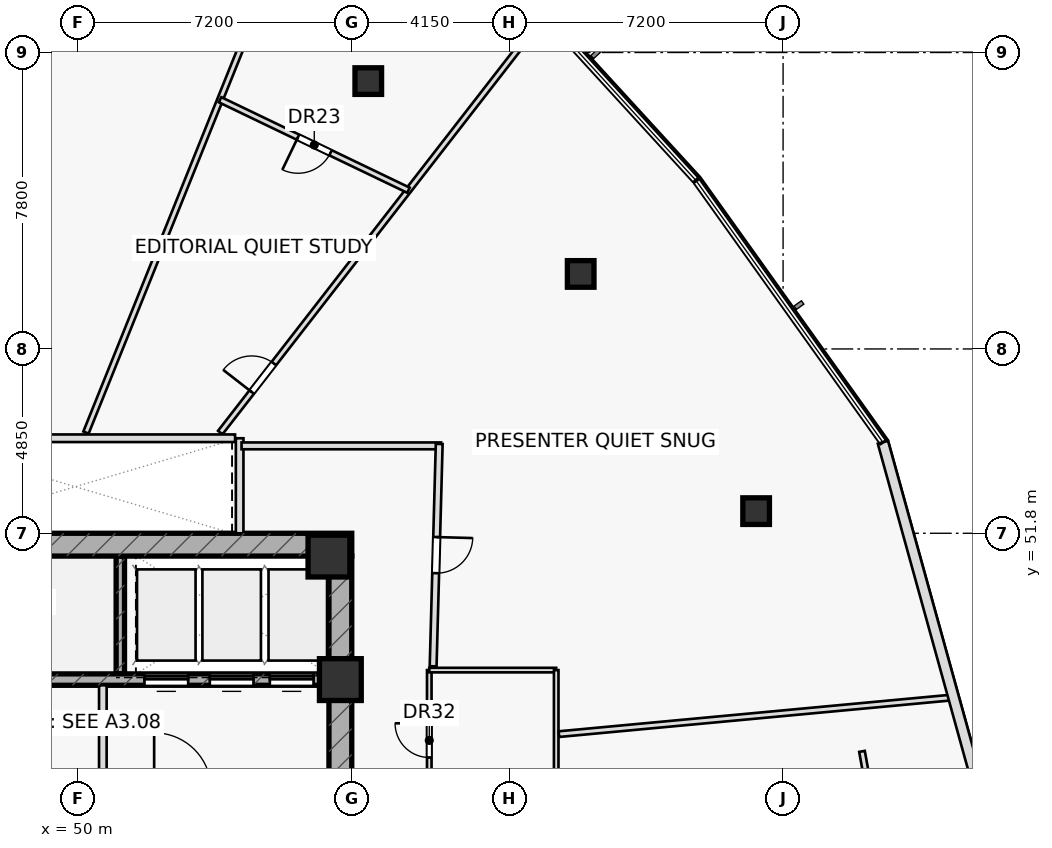
"""IFC4 building model, lengths in metres.
Left out: names, types, materials, properties, quantities, classifications, styles, units other than length and angle.
Written with IfcOpenShell. Run it as: python <this file> out.ifc"""

import sys

from ifc_helpers import new_model, si_unit, direction, frame, frame_2d, origin, origin_2d, place, context, subcontext, project, spatial, rectangle, hollow_rectangle, extrude, element, fill, save


model = new_model("IFC4")
c1 = context("Model", 3, precision=1e-05, world=origin(), true_north=direction((0.0, 1.0)))
c2 = subcontext(c1, "Body", "Model", "MODEL_VIEW")
j1 = project(units=[si_unit("LENGTHUNIT", "METRE"), si_unit("PLANEANGLEUNIT", "RADIAN")], contexts=[c1])
p1 = place(None, origin())
s1 = spatial("IfcSite", under=j1, at=p1, CompositionType="ELEMENT")
p2 = place(p1, origin())
s2 = spatial("IfcBuilding", under=s1, at=p2, CompositionType="ELEMENT")
p3 = place(p2, frame((0.0, 0.0, 62.7)))
s3 = spatial("IfcBuildingStorey", under=s2, at=p3, CompositionType="ELEMENT", Elevation=62.7)
p4 = place(p3, frame((51.11, 48.1, 0.0), z_axis=(0.0, 0.0, 1.0), x_axis=(0.0, 1.0, 0.0)))
e1 = element("IfcWall", 1, at=p4, inside=s3, PredefinedType="SHEAR", context=c2, shape_type="SweptSolid", body=[
    extrude(rectangle(XDim=3.1, YDim=0.22, at=frame_2d((1.55, 0.0))), origin(), (0.0, 0.0, 1.0), 3.6),
])
p5 = place(p3, frame((42.8, 51.5, 0.0), z_axis=(0.0, 0.0, 1.0), x_axis=(1.0, 0.0, 0.0)))
e2 = element("IfcWall", 2, at=p5, inside=s3, PredefinedType="SHEAR", context=c2, shape_type="SweptSolid", body=[
    extrude(rectangle(XDim=14.4, YDim=0.6, at=frame_2d((7.2, 0.0))), origin(), (0.0, 0.0, 1.0), 3.6),
])
p6 = place(p5, frame((0.88, 0.0, 0.0)))
e3 = element("IfcOpeningElement", 3, at=p6, cuts=e2, PredefinedType="OPENING", context=c2, shape_type="SweptSolid", body=[
    extrude(rectangle(XDim=1.05, YDim=2.2, at=frame_2d((0.525, 1.1))), frame((0.0, 0.31, 0.0), z_axis=(0.0, -1.0, 0.0), x_axis=(1.0, 0.0, 0.0)), (0.0, 0.0, 1.0), 0.62),
])
p7 = place(p3, frame((56.9, 38.8, 0.0), z_axis=(0.0, 0.0, 1.0), x_axis=(0.0, 1.0, 0.0)))
e4 = element("IfcWall", 4, at=p7, inside=s3, PredefinedType="SHEAR", context=c2, shape_type="SweptSolid", body=[
    extrude(rectangle(XDim=12.4, YDim=0.6, at=frame_2d((6.2, 0.0))), origin(), (0.0, 0.0, 1.0), 3.6),
])
p8 = place(p7, frame((3.85, 0.0, 0.0)))
e5 = element("IfcOpeningElement", 5, at=p8, cuts=e4, PredefinedType="OPENING", context=c2, shape_type="SweptSolid", body=[
    extrude(rectangle(XDim=1.5, YDim=2.2, at=frame_2d((0.75, 1.1))), frame((0.0, 0.31, 0.0), z_axis=(0.0, -1.0, 0.0), x_axis=(1.0, 0.0, 0.0)), (0.0, 0.0, 1.0), 0.62),
])
p9 = place(p3, frame((43.4, 47.95, 0.0), z_axis=(0.0, 0.0, 1.0), x_axis=(1.0, 0.0, 0.0)))
e6 = element("IfcWall", 6, at=p9, inside=s3, PredefinedType="SHEAR", context=c2, shape_type="SweptSolid", body=[
    extrude(rectangle(XDim=13.2, YDim=0.3, at=frame_2d((6.6, 0.0))), origin(), (0.0, 0.0, 1.0), 3.6),
])
p10 = place(p9, frame((8.345, 0.0, 0.0)))
e7 = element("IfcOpeningElement", 7, at=p10, cuts=e6, PredefinedType="OPENING", context=c2, shape_type="SweptSolid", body=[
    extrude(rectangle(XDim=1.15, YDim=2.2, at=frame_2d((0.575, 1.1))), frame((0.0, 0.16, 0.0), z_axis=(0.0, -1.0, 0.0), x_axis=(1.0, 0.0, 0.0)), (0.0, 0.0, 1.0), 0.32),
])
p11 = place(p9, frame((10.065, 0.0, 0.0)))
e8 = element("IfcOpeningElement", 8, at=p11, cuts=e6, PredefinedType="OPENING", context=c2, shape_type="SweptSolid", body=[
    extrude(rectangle(XDim=1.15, YDim=2.2, at=frame_2d((0.575, 1.1))), frame((0.0, 0.16, 0.0), z_axis=(0.0, -1.0, 0.0), x_axis=(1.0, 0.0, 0.0)), (0.0, 0.0, 1.0), 0.32),
])
p12 = place(p9, frame((11.645, 0.0, 0.0)))
e9 = element("IfcOpeningElement", 9, at=p12, cuts=e6, PredefinedType="OPENING", context=c2, shape_type="SweptSolid", body=[
    extrude(rectangle(XDim=1.15, YDim=2.2, at=frame_2d((0.575, 1.1))), frame((0.0, 0.16, 0.0), z_axis=(0.0, -1.0, 0.0), x_axis=(1.0, 0.0, 0.0)), (0.0, 0.0, 1.0), 0.32),
])
for number, where, z_axis, x_axis in (
    (10, (56.9, 47.95, 0.0), (0.0, 0.0, 1.0), (1.0, 0.0, 0.0)),
    (11, (56.6, 51.2, 0.0), (0.0, 0.0, 1.0), (1.0, 0.0, 0.0)),
):
    element("IfcColumn", number, at=place(p3, frame(where, z_axis=z_axis, x_axis=x_axis)), inside=s3, PredefinedType="COLUMN", context=c2, shape_type="SweptSolid", body=[
        extrude(rectangle(XDim=1.1, YDim=1.1, at=origin_2d()), origin(), (0.0, 0.0, 1.0), 3.6),
    ])
for number, where, z_axis, x_axis in (
    (12, (67.841, 52.383, 0.0), (0.0, 0.0, 1.0), (1.0, 0.0, 0.0)),
    (13, (63.224, 58.624, 0.0), (0.0, 0.0, 1.0), (1.0, 0.0, 0.0)),
    (14, (57.635, 63.698, 0.0), (0.0, 0.0, 1.0), (1.0, 0.0, 0.0)),
):
    element("IfcColumn", number, at=place(p3, frame(where, z_axis=z_axis, x_axis=x_axis)), inside=s3, PredefinedType="COLUMN", context=c2, shape_type="SweptSolid", body=[
        extrude(hollow_rectangle(XDim=0.7, YDim=0.7, WallThickness=0.04, at=origin_2d()), origin(), (0.0, 0.0, 1.0), 3.6),
    ])
p13 = place(p3, frame((54.25, 51.8, 0.0), z_axis=(0.0, 0.0, 1.0), x_axis=(0.0, 1.0, 0.0)))
e15 = element("IfcWall", 15, at=p13, inside=s3, PredefinedType="PARTITIONING", context=c2, shape_type="SweptSolid", body=[
    extrude(rectangle(XDim=2.5, YDim=0.2, at=frame_2d((1.25, 0.0))), origin(), (0.0, 0.0, 1.0), 3.6),
])
p14 = place(p3, frame((50.65, 45.05, 0.0), z_axis=(0.0, 0.0, 1.0), x_axis=(0.0, 1.0, 0.0)))
e16 = element("IfcWall", 16, at=p14, inside=s3, PredefinedType="PARTITIONING", context=c2, shape_type="SweptSolid", body=[
    extrude(rectangle(XDim=2.75, YDim=0.2, at=frame_2d((1.375, 0.0))), origin(), (0.0, 0.0, 1.0), 3.6),
])
p15 = place(p3, frame((72.969, 33.091, 0.0), z_axis=(0.0, 0.0, 1.0), x_axis=(-0.177742578179, 0.984077017261, 0.0)))
e17 = element("IfcWall", 17, at=p15, inside=s3, PredefinedType="PARTITIONING", context=c2, shape_type="SweptSolid", body=[
    extrude(rectangle(XDim=13.179, YDim=0.15, at=frame_2d((6.59, 0.0))), origin(), (0.0, 0.0, 1.0), 2.975),
])
p16 = place(p3, frame((59.24, 41.2, 0.0), z_axis=(0.0, 0.0, 1.0), x_axis=(0.0, 1.0, 0.0)))
e18 = element("IfcWall", 18, at=p16, inside=s3, PredefinedType="PARTITIONING", context=c2, shape_type="SweptSolid", body=[
    extrude(rectangle(XDim=7.0, YDim=0.12, at=frame_2d((3.5, 0.0))), origin(), (0.0, 0.0, 1.0), 3.6),
])
p17 = place(p16, frame((1.15, 0.0, 0.0)))
e19 = element("IfcOpeningElement", 19, at=p17, cuts=e18, PredefinedType="OPENING", context=c2, shape_type="SweptSolid", body=[
    extrude(rectangle(XDim=0.9, YDim=2.05, at=frame_2d((0.45, 1.025))), frame((0.0, 0.07, 0.0), z_axis=(0.0, -1.0, 0.0), x_axis=(1.0, 0.0, 0.0)), (0.0, 0.0, 1.0), 0.14),
])
p18 = place(p16, frame((4.7, 0.0, 0.0)))
e20 = element("IfcOpeningElement", 20, at=p18, cuts=e18, PredefinedType="OPENING", context=c2, shape_type="SweptSolid", body=[
    extrude(rectangle(XDim=0.9, YDim=2.05, at=frame_2d((0.45, 1.025))), frame((0.0, 0.07, 0.0), z_axis=(0.0, -1.0, 0.0), x_axis=(1.0, 0.0, 0.0)), (0.0, 0.0, 1.0), 0.14),
])
p19 = place(p3, frame((59.24, 48.2, 0.0), z_axis=(0.0, 0.0, 1.0), x_axis=(1.0, 0.0, 0.0)))
e21 = element("IfcWall", 21, at=p19, inside=s3, PredefinedType="PARTITIONING", context=c2, shape_type="SweptSolid", body=[
    extrude(rectangle(XDim=3.34, YDim=0.12, at=frame_2d((1.67, 0.0))), origin(), (0.0, 0.0, 1.0), 3.6),
])
p20 = place(p3, frame((62.58, 41.2, 0.0), z_axis=(0.0, 0.0, 1.0), x_axis=(0.0, 1.0, 0.0)))
e22 = element("IfcWall", 22, at=p20, inside=s3, PredefinedType="PARTITIONING", context=c2, shape_type="SweptSolid", body=[
    extrude(rectangle(XDim=7.0, YDim=0.12, at=frame_2d((3.5, 0.0))), origin(), (0.0, 0.0, 1.0), 3.6),
])
p21 = place(p3, frame((62.65, 46.515, 0.0), z_axis=(0.0, 0.0, 1.0), x_axis=(0.995682440143, 0.092824987962, 0.0)))
e23 = element("IfcWall", 23, at=p21, inside=s3, PredefinedType="PARTITIONING", context=c2, shape_type="SweptSolid", body=[
    extrude(rectangle(XDim=10.442, YDim=0.15, at=frame_2d((5.221, 0.0))), origin(), (0.0, 0.0, 1.0), 3.025),
])
p22 = place(p3, frame((53.74, 54.45, 0.0), z_axis=(0.0, 0.0, 1.0), x_axis=(0.613423233684, 0.78975435192, 0.0)))
e24 = element("IfcWall", 24, at=p22, inside=s3, PredefinedType="PARTITIONING", context=c2, shape_type="SweptSolid", body=[
    extrude(rectangle(XDim=13.92, YDim=0.15, at=frame_2d((6.96, 0.0))), origin(), (0.0, 0.0, 1.0), 2.975),
])
p23 = place(p22, frame((1.35, 0.0, 0.0)))
e25 = element("IfcOpeningElement", 25, at=p23, cuts=e24, PredefinedType="OPENING", context=c2, shape_type="SweptSolid", body=[
    extrude(rectangle(XDim=0.95, YDim=2.05, at=frame_2d((0.475, 1.025))), frame((0.0, 0.085, 0.0), z_axis=(0.0, -1.0, 0.0), x_axis=(1.0, 0.0, 0.0)), (0.0, 0.0, 1.0), 0.17),
])
p24 = place(p3, frame((50.207, 54.45, 0.0), z_axis=(0.0, 0.0, 1.0), x_axis=(0.373649555397, 0.927569948711, 0.0)))
e26 = element("IfcWall", 26, at=p24, inside=s3, PredefinedType="PARTITIONING", context=c2, shape_type="SweptSolid", body=[
    extrude(rectangle(XDim=16.279, YDim=0.15, at=frame_2d((8.139, 0.0))), origin(), (0.0, 0.0, 1.0), 2.975),
])
p25 = place(p3, frame((58.693, 60.826, 0.0), z_axis=(0.0, 0.0, 1.0), x_axis=(-0.901424681966, 0.432935956861, 0.0)))
e27 = element("IfcWall", 27, at=p25, inside=s3, PredefinedType="PARTITIONING", context=c2, shape_type="SweptSolid", body=[
    extrude(rectangle(XDim=5.5, YDim=0.15, at=frame_2d((2.75, 0.0))), origin(), (0.0, 0.0, 1.0), 2.975),
])
p26 = place(p25, frame((2.275, 0.0, 0.0)))
e28 = element("IfcOpeningElement", 28, at=p26, cuts=e27, PredefinedType="OPENING", context=c2, shape_type="SweptSolid", body=[
    extrude(rectangle(XDim=0.95, YDim=2.05, at=frame_2d((0.475, 1.025))), frame((0.0, 0.085, 0.0), z_axis=(0.0, -1.0, 0.0), x_axis=(1.0, 0.0, 0.0)), (0.0, 0.0, 1.0), 0.17),
])
p27 = place(p3, frame((54.3, 54.1, 0.0), z_axis=(0.0, 0.0, 1.0), x_axis=(1.0, 0.0, 0.0)))
e29 = element("IfcWall", 29, at=p27, inside=s3, PredefinedType="PARTITIONING", context=c2, shape_type="SweptSolid", body=[
    extrude(rectangle(XDim=5.25, YDim=0.18, at=frame_2d((2.625, 0.0))), origin(), (0.0, 0.0, 1.0), 2.975),
])
p28 = place(p3, frame((59.501, 54.15, 0.0), z_axis=(0.0, 0.0, 1.0), x_axis=(-0.027367567602, -0.999625437973, 0.0)))
e30 = element("IfcWall", 30, at=p28, inside=s3, PredefinedType="PARTITIONING", context=c2, shape_type="SweptSolid", body=[
    extrude(rectangle(XDim=5.852, YDim=0.18, at=frame_2d((2.926, 0.0))), origin(), (0.0, 0.0, 1.0), 2.975),
])
p29 = place(p28, frame((2.451, 0.0, 0.0)))
e31 = element("IfcOpeningElement", 31, at=p29, cuts=e30, PredefinedType="OPENING", context=c2, shape_type="SweptSolid", body=[
    extrude(rectangle(XDim=0.95, YDim=2.05, at=frame_2d((0.475, 1.025))), frame((0.0, 0.1, 0.0), z_axis=(0.0, -1.0, 0.0), x_axis=(1.0, 0.0, 0.0)), (0.0, 0.0, 1.0), 0.2),
])
p30 = place(p3, frame((73.611, 45.407, 0.0), z_axis=(0.0, 0.0, 1.0), x_axis=(-0.266889795183, 0.963727055357, 0.0)))
e32 = element("IfcWall", 32, at=p30, inside=s3, PredefinedType="STANDARD", context=c2, shape_type="SweptSolid", body=[
    extrude(rectangle(XDim=9.118, YDim=0.28, at=frame_2d((4.559, 0.0))), origin(), (0.0, 0.0, 1.0), 3.6),
])
p31 = place(p3, frame((45.82, 54.3, 0.0), z_axis=(0.0, 0.0, 1.0), x_axis=(1.0, 0.0, 0.0)))
e33 = element("IfcWall", 33, at=p31, inside=s3, PredefinedType="PARTITIONING", context=c2, shape_type="SweptSolid", body=[
    extrude(rectangle(XDim=8.31, YDim=0.2, at=frame_2d((4.155, 0.0))), origin(), (0.0, 0.0, 1.0), 3.6),
])
p32 = place(p18, origin())
e34 = element("IfcDoor", 34, at=p32, inside=s3, OperationType="SINGLE_SWING_RIGHT", PredefinedType="DOOR", context=c2, shape_type="SweptSolid", body=[
    extrude(rectangle(XDim=0.9, YDim=2.05, at=frame_2d((0.45, 1.025))), frame((0.0, 0.025, 0.0), z_axis=(0.0, -1.0, 0.0), x_axis=(1.0, 0.0, 0.0)), (0.0, 0.0, 1.0), 0.05),
])
fill(e20, e34)
p33 = place(p23, origin())
e35 = element("IfcDoor", 35, at=p33, inside=s3, OperationType="SINGLE_SWING_LEFT", PredefinedType="DOOR", context=c2, shape_type="SweptSolid", body=[
    extrude(rectangle(XDim=0.95, YDim=2.05, at=frame_2d((0.475, 1.025))), frame((0.0, 0.025, 0.0), z_axis=(0.0, -1.0, 0.0), x_axis=(1.0, 0.0, 0.0)), (0.0, 0.0, 1.0), 0.05),
])
fill(e25, e35)
p34 = place(p26, origin())
e36 = element("IfcDoor", 36, at=p34, inside=s3, OperationType="SINGLE_SWING_RIGHT", PredefinedType="DOOR", context=c2, shape_type="SweptSolid", body=[
    extrude(rectangle(XDim=0.95, YDim=2.05, at=frame_2d((0.475, 1.025))), frame((0.0, 0.025, 0.0), z_axis=(0.0, -1.0, 0.0), x_axis=(1.0, 0.0, 0.0)), (0.0, 0.0, 1.0), 0.05),
])
fill(e28, e36)
p35 = place(p29, origin())
e37 = element("IfcDoor", 37, at=p35, inside=s3, OperationType="SINGLE_SWING_LEFT", PredefinedType="DOOR", context=c2, shape_type="SweptSolid", body=[
    extrude(rectangle(XDim=0.95, YDim=2.05, at=frame_2d((0.475, 1.025))), frame((0.0, 0.025, 0.0), z_axis=(0.0, -1.0, 0.0), x_axis=(1.0, 0.0, 0.0)), (0.0, 0.0, 1.0), 0.05),
])
fill(e31, e37)
p36 = place(p10, origin())
e38 = element("IfcDoor", 38, at=p36, inside=s3, OperationType="SLIDING_TO_LEFT", PredefinedType="DOOR", context=c2, shape_type="SweptSolid", body=[
    extrude(rectangle(XDim=1.15, YDim=2.2, at=frame_2d((0.575, 1.1))), frame((0.0, 0.025, 0.0), z_axis=(0.0, -1.0, 0.0), x_axis=(1.0, 0.0, 0.0)), (0.0, 0.0, 1.0), 0.05),
])
fill(e7, e38)
p37 = place(p11, origin())
e39 = element("IfcDoor", 39, at=p37, inside=s3, OperationType="SLIDING_TO_LEFT", PredefinedType="DOOR", context=c2, shape_type="SweptSolid", body=[
    extrude(rectangle(XDim=1.15, YDim=2.2, at=frame_2d((0.575, 1.1))), frame((0.0, 0.025, 0.0), z_axis=(0.0, -1.0, 0.0), x_axis=(1.0, 0.0, 0.0)), (0.0, 0.0, 1.0), 0.05),
])
fill(e8, e39)
p38 = place(p12, origin())
e40 = element("IfcDoor", 40, at=p38, inside=s3, OperationType="SLIDING_TO_LEFT", PredefinedType="DOOR", context=c2, shape_type="SweptSolid", body=[
    extrude(rectangle(XDim=1.15, YDim=2.2, at=frame_2d((0.575, 1.1))), frame((0.0, 0.025, 0.0), z_axis=(0.0, -1.0, 0.0), x_axis=(1.0, 0.0, 0.0)), (0.0, 0.0, 1.0), 0.05),
])
fill(e9, e40)
save(model, sys.argv[1])
